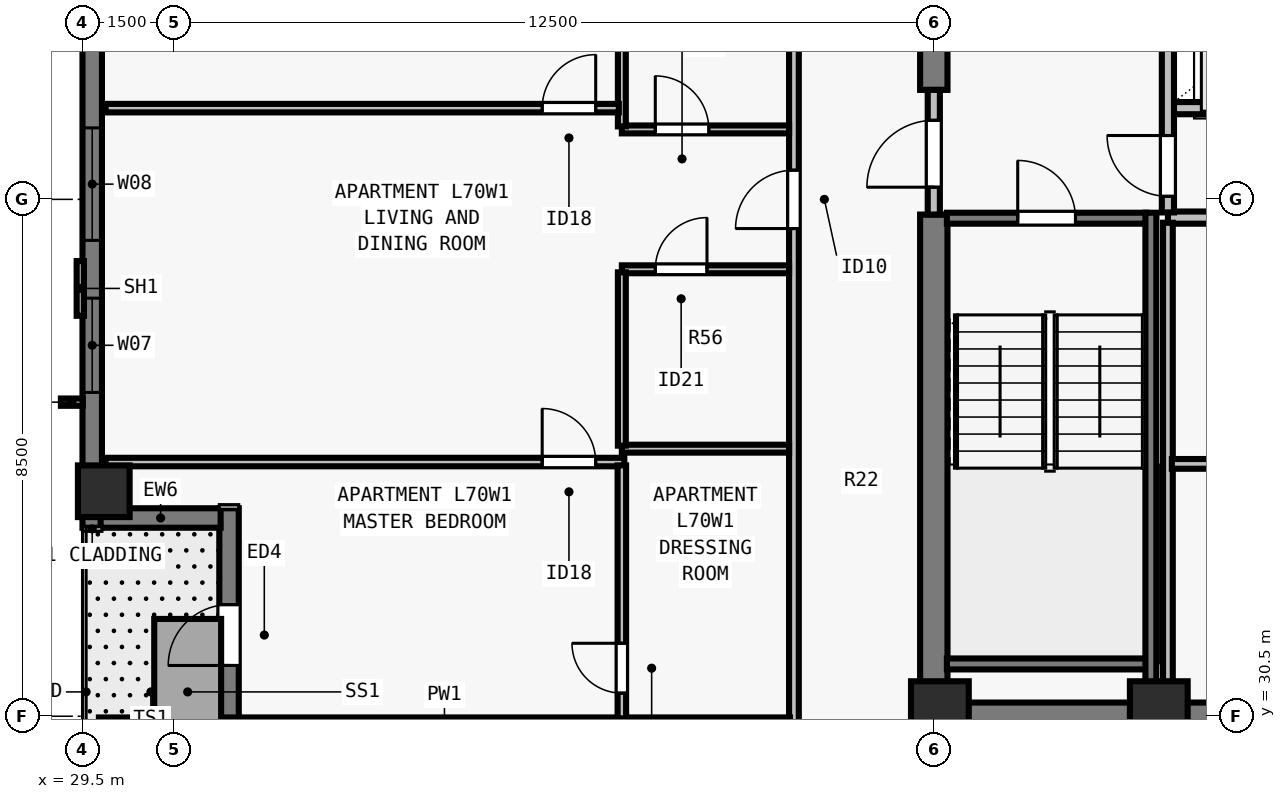
"""IFC4 building model, lengths in metres.
Left out: names, types, materials, properties, quantities, classifications, styles, units other than length and angle.
Written with IfcOpenShell. Run it as: python <this file> out.ifc"""

import sys

from ifc_helpers import new_model, si_unit, direction, frame, frame_2d, origin, origin_2d, place, context, subcontext, project, spatial, rectangle, extrude, element, fill, save


model = new_model("IFC4")
c1 = context("Model", 3, precision=1e-05, world=origin(), true_north=direction((0.0, 1.0)))
c2 = subcontext(c1, "Body", "Model", "MODEL_VIEW")
j1 = project(units=[si_unit("LENGTHUNIT", "METRE"), si_unit("PLANEANGLEUNIT", "RADIAN")], contexts=[c1])
p1 = place(None, origin())
s1 = spatial("IfcSite", under=j1, at=p1, CompositionType="ELEMENT")
p2 = place(p1, origin())
s2 = spatial("IfcBuilding", under=s1, at=p2, CompositionType="ELEMENT")
p3 = place(p2, frame((0.0, 0.0, 255.0)))
s3 = spatial("IfcBuildingStorey", under=s2, at=p3, CompositionType="ELEMENT", Elevation=255.0)
for number, where, z_axis, x_axis in (
    (1, (43.6, 30.6, 0.0), (0.0, 0.0, 1.0), (1.0, 0.0, 0.0)),
    (2, (47.2, 30.6, 0.0), (0.0, 0.0, 1.0), (1.0, 0.0, 0.0)),
):
    element("IfcColumn", number, at=place(p3, frame(where, z_axis=z_axis, x_axis=x_axis)), inside=s3, PredefinedType="COLUMN", context=c2, shape_type="SweptSolid", body=[
        extrude(rectangle(XDim=0.95, YDim=0.95, at=origin_2d()), origin(), (0.0, 0.0, 1.0), 3.5),
    ])
p4 = place(p3, frame((29.85, 34.2, 0.0), z_axis=(0.0, 0.0, 1.0), x_axis=(0.0, 1.0, 0.0)))
e3 = element("IfcColumn", 3, at=p4, inside=s3, PredefinedType="COLUMN", context=c2, shape_type="SweptSolid", body=[
    extrude(rectangle(XDim=0.85, YDim=0.85, at=origin_2d()), origin(), (0.0, 0.0, 1.0), 3.5),
])
p5 = place(p3, frame((29.66, 33.6, 0.0), z_axis=(0.0, 0.0, 1.0), x_axis=(0.0, 1.0, 0.0)))
e4 = element("IfcWall", 4, at=p5, inside=s3, PredefinedType="SOLIDWALL", context=c2, shape_type="SweptSolid", body=[
    extrude(rectangle(XDim=22.602, YDim=0.32, at=frame_2d((11.301, 0.0))), origin(), (0.0, 0.0, 1.0), 3.29),
])
p6 = place(p5, frame((2.225, 0.0, 0.8)))
e5 = element("IfcOpeningElement", 5, at=p6, cuts=e4, PredefinedType="OPENING", context=c2, shape_type="SweptSolid", body=[
    extrude(rectangle(XDim=1.55, YDim=1.678, at=frame_2d((0.775, 0.839))), frame((0.0, 0.17, 0.0), z_axis=(0.0, -1.0, 0.0), x_axis=(1.0, 0.0, 0.0)), (0.0, 0.0, 1.0), 0.34),
])
p7 = place(p5, frame((4.726, 0.0, 0.8)))
e6 = element("IfcOpeningElement", 6, at=p7, cuts=e4, PredefinedType="OPENING", context=c2, shape_type="SweptSolid", body=[
    extrude(rectangle(XDim=1.85, YDim=1.678, at=frame_2d((0.925, 0.839))), frame((0.0, 0.17, 0.0), z_axis=(0.0, -1.0, 0.0), x_axis=(1.0, 0.0, 0.0)), (0.0, 0.0, 1.0), 0.34),
])
p8 = place(p5, frame((11.726, 0.0, 0.8)))
e7 = element("IfcOpeningElement", 7, at=p8, cuts=e4, PredefinedType="OPENING", context=c2, shape_type="SweptSolid", body=[
    extrude(rectangle(XDim=1.85, YDim=1.678, at=frame_2d((0.925, 0.839))), frame((0.0, 0.17, 0.0), z_axis=(0.0, -1.0, 0.0), x_axis=(1.0, 0.0, 0.0)), (0.0, 0.0, 1.0), 0.34),
])
p9 = place(p3, frame((31.91, 28.178, 0.0), z_axis=(0.0, 0.0, 1.0), x_axis=(0.0, 1.0, 0.0)))
e8 = element("IfcWall", 8, at=p9, inside=s3, PredefinedType="SOLIDWALL", context=c2, shape_type="SweptSolid", body=[
    extrude(rectangle(XDim=5.742, YDim=0.32, at=frame_2d((2.871, 0.0))), origin(), (0.0, 0.0, 1.0), 3.29),
])
p10 = place(p9, frame((3.157, 0.0, 0.0)))
e9 = element("IfcOpeningElement", 9, at=p10, cuts=e8, PredefinedType="OPENING", context=c2, shape_type="SweptSolid", body=[
    extrude(rectangle(XDim=1.0, YDim=2.15, at=frame_2d((0.5, 1.075))), frame((0.0, 0.17, 0.0), z_axis=(0.0, -1.0, 0.0), x_axis=(1.0, 0.0, 0.0)), (0.0, 0.0, 1.0), 0.34),
])
p11 = place(p3, frame((31.772, 33.76, 0.0), z_axis=(0.0, 0.0, 1.0), x_axis=(-1.0, 0.0, 0.0)))
e10 = element("IfcWall", 10, at=p11, inside=s3, PredefinedType="SOLIDWALL", context=c2, shape_type="SweptSolid", body=[
    extrude(rectangle(XDim=1.974, YDim=0.32, at=frame_2d((0.987, 0.0))), origin(), (0.0, 0.0, 1.0), 3.29),
])
p12 = place(p3, frame((43.275, 30.5, 0.0), z_axis=(0.0, 0.0, 1.0), x_axis=(1.0, 0.0, 0.0)))
e11 = element("IfcWall", 11, at=p12, inside=s3, PredefinedType="SHEAR", context=c2, shape_type="SweptSolid", body=[
    extrude(rectangle(XDim=17.45, YDim=0.45, at=frame_2d((8.725, 0.0))), origin(), (0.0, 0.0, 1.0), 3.29),
])
p13 = place(p3, frame((43.5, 30.715, 0.0), z_axis=(0.0, 0.0, 1.0), x_axis=(0.0, 1.0, 0.0)))
e12 = element("IfcWall", 12, at=p13, inside=s3, PredefinedType="SHEAR", context=c2, shape_type="SweptSolid", body=[
    extrude(rectangle(XDim=8.035, YDim=0.45, at=frame_2d((4.018, 0.0))), origin(), (0.0, 0.0, 1.0), 3.29),
])
p14 = place(p3, frame((43.5, 40.8, 0.0), z_axis=(0.0, 0.0, 1.0), x_axis=(0.0, 1.0, 0.0)))
e13 = element("IfcWall", 13, at=p14, inside=s3, PredefinedType="SHEAR", context=c2, shape_type="SweptSolid", body=[
    extrude(rectangle(XDim=6.485, YDim=0.45, at=frame_2d((3.242, 0.0))), origin(), (0.0, 0.0, 1.0), 3.29),
])
for number, where, z_axis, x_axis in (
    (14, (47.35, 38.7, 0.0), (0.0, 0.0, 1.0), (1.0, 0.0, 0.0)),
    (15, (47.35, 40.5, 0.0), (0.0, 0.0, 1.0), (1.0, 0.0, 0.0)),
):
    element("IfcWall", number, at=place(p3, frame(where, z_axis=z_axis, x_axis=x_axis)), inside=s3, PredefinedType="SOLIDWALL", context=c2, shape_type="SweptSolid", body=[
        extrude(rectangle(XDim=2.95, YDim=0.2, at=frame_2d((1.475, 0.0))), origin(), (0.0, 0.0, 1.0), 3.29),
    ])
p15 = place(p3, frame((43.5, 38.75, 0.0), z_axis=(0.0, 0.0, 1.0), x_axis=(0.0, 1.0, 0.0)))
e16 = element("IfcWall", 16, at=p15, inside=s3, PredefinedType="SOLIDWALL", context=c2, shape_type="SweptSolid", body=[
    extrude(rectangle(XDim=2.05, YDim=0.2, at=frame_2d((1.025, 0.0))), origin(), (0.0, 0.0, 1.0), 3.29),
])
p16 = place(p15, frame((0.45, 0.0, 0.0)))
e17 = element("IfcOpeningElement", 17, at=p16, cuts=e16, PredefinedType="OPENING", context=c2, shape_type="SweptSolid", body=[
    extrude(rectangle(XDim=1.1, YDim=2.15, at=frame_2d((0.55, 1.075))), frame((0.0, 0.11, 0.0), z_axis=(0.0, -1.0, 0.0), x_axis=(1.0, 0.0, 0.0)), (0.0, 0.0, 1.0), 0.22),
])
p17 = place(p3, frame((47.35, 38.785, 0.0), z_axis=(0.0, 0.0, 1.0), x_axis=(0.0, 1.0, 0.0)))
e18 = element("IfcWall", 18, at=p17, inside=s3, PredefinedType="SOLIDWALL", context=c2, shape_type="SweptSolid", body=[
    extrude(rectangle(XDim=4.865, YDim=0.2, at=frame_2d((2.433, 0.0))), origin(), (0.0, 0.0, 1.0), 3.29),
])
p18 = place(p17, frame((0.265, 0.0, 0.0)))
e19 = element("IfcOpeningElement", 19, at=p18, cuts=e18, PredefinedType="OPENING", context=c2, shape_type="SweptSolid", body=[
    extrude(rectangle(XDim=1.0, YDim=2.15, at=frame_2d((0.5, 1.075))), frame((0.0, 0.11, 0.0), z_axis=(0.0, -1.0, 0.0), x_axis=(1.0, 0.0, 0.0)), (0.0, 0.0, 1.0), 0.22),
])
p19 = place(p3, frame((47.35, 30.71, 0.0), z_axis=(0.0, 0.0, 1.0), x_axis=(0.0, 1.0, 0.0)))
e20 = element("IfcWall", 20, at=p19, inside=s3, PredefinedType="PARTITIONING", context=c2, shape_type="SweptSolid", body=[
    extrude(rectangle(XDim=7.905, YDim=0.16, at=frame_2d((3.953, 0.0))), origin(), (0.0, 0.0, 1.0), 3.29),
])
p20 = place(p3, frame((47.415, 34.65, 0.0), z_axis=(0.0, 0.0, 1.0), x_axis=(1.0, 0.0, 0.0)))
e21 = element("IfcWall", 21, at=p20, inside=s3, PredefinedType="PARTITIONING", context=c2, shape_type="SweptSolid", body=[
    extrude(rectangle(XDim=2.8, YDim=0.16, at=frame_2d((1.4, 0.0))), origin(), (0.0, 0.0, 1.0), 3.29),
])
p21 = place(p3, frame((41.2, 30.4, 0.0), z_axis=(0.0, 0.0, 1.0), x_axis=(0.0, 1.0, 0.0)))
e22 = element("IfcWall", 22, at=p21, inside=s3, PredefinedType="PARTITIONING", context=c2, shape_type="SweptSolid", body=[
    extrude(rectangle(XDim=17.2, YDim=0.16, at=frame_2d((8.6, 0.0))), origin(), (0.0, 0.0, 1.0), 3.29),
])
p22 = place(p21, frame((8.12, 0.0, 0.0)))
e23 = element("IfcOpeningElement", 23, at=p22, cuts=e22, PredefinedType="OPENING", context=c2, shape_type="SweptSolid", body=[
    extrude(rectangle(XDim=0.96, YDim=2.18, at=frame_2d((0.48, 1.09))), frame((0.0, 0.09, 0.0), z_axis=(0.0, -1.0, 0.0), x_axis=(1.0, 0.0, 0.0)), (0.0, 0.0, 1.0), 0.18),
])
p23 = place(p3, frame((29.77, 30.4, 0.0), z_axis=(0.0, 0.0, 1.0), x_axis=(1.0, 0.0, 0.0)))
e24 = element("IfcWall", 24, at=p23, inside=s3, PredefinedType="PARTITIONING", context=c2, shape_type="SweptSolid", body=[
    extrude(rectangle(XDim=11.365, YDim=0.16, at=frame_2d((5.683, 0.0))), origin(), (0.0, 0.0, 1.0), 3.29),
])
p24 = place(p3, frame((38.37, 34.9, 0.0), z_axis=(0.0, 0.0, 1.0), x_axis=(1.0, 0.0, 0.0)))
e25 = element("IfcWall", 25, at=p24, inside=s3, PredefinedType="PLUMBINGWALL", context=c2, shape_type="SweptSolid", body=[
    extrude(rectangle(XDim=2.75, YDim=0.13, at=frame_2d((1.375, 0.0))), origin(), (0.0, 0.0, 1.0), 3.29),
])
p25 = place(p3, frame((38.37, 37.85, 0.0), z_axis=(0.0, 0.0, 1.0), x_axis=(1.0, 0.0, 0.0)))
e26 = element("IfcWall", 26, at=p25, inside=s3, PredefinedType="PLUMBINGWALL", context=c2, shape_type="SweptSolid", body=[
    extrude(rectangle(XDim=2.75, YDim=0.13, at=frame_2d((1.375, 0.0))), origin(), (0.0, 0.0, 1.0), 3.29),
])
p26 = place(p25, frame((0.55, 0.0, 0.0)))
e27 = element("IfcOpeningElement", 27, at=p26, cuts=e26, PredefinedType="OPENING", context=c2, shape_type="SweptSolid", body=[
    extrude(rectangle(XDim=0.85, YDim=2.08, at=frame_2d((0.425, 1.04))), frame((0.0, 0.075, 0.0), z_axis=(0.0, -1.0, 0.0), x_axis=(1.0, 0.0, 0.0)), (0.0, 0.0, 1.0), 0.15),
])
p27 = place(p3, frame((38.37, 34.95, 0.0), z_axis=(0.0, 0.0, 1.0), x_axis=(0.0, 1.0, 0.0)))
e28 = element("IfcWall", 28, at=p27, inside=s3, PredefinedType="PLUMBINGWALL", context=c2, shape_type="SweptSolid", body=[
    extrude(rectangle(XDim=2.85, YDim=0.13, at=frame_2d((1.425, 0.0))), origin(), (0.0, 0.0, 1.0), 3.29),
])
p28 = place(p3, frame((38.37, 40.15, 0.0), z_axis=(0.0, 0.0, 1.0), x_axis=(1.0, 0.0, 0.0)))
e29 = element("IfcWall", 29, at=p28, inside=s3, PredefinedType="PLUMBINGWALL", context=c2, shape_type="SweptSolid", body=[
    extrude(rectangle(XDim=2.75, YDim=0.13, at=frame_2d((1.375, 0.0))), origin(), (0.0, 0.0, 1.0), 3.29),
])
p29 = place(p28, frame((0.55, 0.0, 0.0)))
e30 = element("IfcOpeningElement", 30, at=p29, cuts=e29, PredefinedType="OPENING", context=c2, shape_type="SweptSolid", body=[
    extrude(rectangle(XDim=0.88, YDim=2.1, at=frame_2d((0.44, 1.05))), frame((0.0, 0.075, 0.0), z_axis=(0.0, -1.0, 0.0), x_axis=(1.0, 0.0, 0.0)), (0.0, 0.0, 1.0), 0.15),
])
p30 = place(p3, frame((38.37, 40.2, 0.0), z_axis=(0.0, 0.0, 1.0), x_axis=(0.0, 1.0, 0.0)))
e31 = element("IfcWall", 31, at=p30, inside=s3, PredefinedType="PLUMBINGWALL", context=c2, shape_type="SweptSolid", body=[
    extrude(rectangle(XDim=3.15, YDim=0.13, at=frame_2d((1.575, 0.0))), origin(), (0.0, 0.0, 1.0), 3.29),
])
p31 = place(p3, frame((29.88, 34.68, 0.0), z_axis=(0.0, 0.0, 1.0), x_axis=(1.0, 0.0, 0.0)))
e32 = element("IfcWall", 32, at=p31, inside=s3, PredefinedType="PARTITIONING", context=c2, shape_type="SweptSolid", body=[
    extrude(rectangle(XDim=8.53, YDim=0.14, at=frame_2d((4.265, 0.0))), origin(), (0.0, 0.0, 1.0), 2.958),
])
p32 = place(p31, frame((7.18, 0.0, 0.0)))
e33 = element("IfcOpeningElement", 33, at=p32, cuts=e32, PredefinedType="OPENING", context=c2, shape_type="SweptSolid", body=[
    extrude(rectangle(XDim=0.88, YDim=2.1, at=frame_2d((0.44, 1.05))), frame((0.0, 0.08, 0.0), z_axis=(0.0, -1.0, 0.0), x_axis=(1.0, 0.0, 0.0)), (0.0, 0.0, 1.0), 0.16),
])
p33 = place(p3, frame((38.37, 30.465, 0.0), z_axis=(0.0, 0.0, 1.0), x_axis=(0.0, 1.0, 0.0)))
e34 = element("IfcWall", 34, at=p33, inside=s3, PredefinedType="PARTITIONING", context=c2, shape_type="SweptSolid", body=[
    extrude(rectangle(XDim=4.16, YDim=0.14, at=frame_2d((2.08, 0.0))), origin(), (0.0, 0.0, 1.0), 3.29),
])
p34 = place(p33, frame((0.415, 0.0, 0.0)))
e35 = element("IfcOpeningElement", 35, at=p34, cuts=e34, PredefinedType="OPENING", context=c2, shape_type="SweptSolid", body=[
    extrude(rectangle(XDim=0.82, YDim=2.1, at=frame_2d((0.41, 1.05))), frame((0.0, 0.08, 0.0), z_axis=(0.0, -1.0, 0.0), x_axis=(1.0, 0.0, 0.0)), (0.0, 0.0, 1.0), 0.16),
])
p35 = place(p3, frame((29.88, 40.5, 0.0), z_axis=(0.0, 0.0, 1.0), x_axis=(1.0, 0.0, 0.0)))
e36 = element("IfcWall", 36, at=p35, inside=s3, PredefinedType="PARTITIONING", context=c2, shape_type="SweptSolid", body=[
    extrude(rectangle(XDim=8.44, YDim=0.14, at=frame_2d((4.22, 0.0))), origin(), (0.0, 0.0, 1.0), 2.958),
])
p36 = place(p35, frame((7.18, 0.0, 0.0)))
e37 = element("IfcOpeningElement", 37, at=p36, cuts=e36, PredefinedType="OPENING", context=c2, shape_type="SweptSolid", body=[
    extrude(rectangle(XDim=0.88, YDim=2.1, at=frame_2d((0.44, 1.05))), frame((0.0, 0.08, 0.0), z_axis=(0.0, -1.0, 0.0), x_axis=(1.0, 0.0, 0.0)), (0.0, 0.0, 1.0), 0.16),
])
p37 = place(p3, frame((43.715, 38.69, 0.0), z_axis=(0.0, 0.0, 1.0), x_axis=(1.0, 0.0, 0.0)))
e38 = element("IfcWall", 38, at=p37, inside=s3, PredefinedType="SOLIDWALL", context=c2, shape_type="SweptSolid", body=[
    extrude(rectangle(XDim=3.28, YDim=0.18, at=frame_2d((1.64, 0.0))), origin(), (0.0, 0.0, 1.0), 3.29),
])
p38 = place(p37, frame((1.165, 0.0, 0.0)))
e39 = element("IfcOpeningElement", 39, at=p38, cuts=e38, PredefinedType="OPENING", context=c2, shape_type="SweptSolid", body=[
    extrude(rectangle(XDim=0.95, YDim=2.15, at=frame_2d((0.475, 1.075))), frame((0.0, 0.1, 0.0), z_axis=(0.0, -1.0, 0.0), x_axis=(1.0, 0.0, 0.0)), (0.0, 0.0, 1.0), 0.2),
])
p39 = place(p3, frame((43.715, 31.36, 0.0), z_axis=(0.0, 0.0, 1.0), x_axis=(1.0, 0.0, 0.0)))
e40 = element("IfcWall", 40, at=p39, inside=s3, PredefinedType="SOLIDWALL", context=c2, shape_type="SweptSolid", body=[
    extrude(rectangle(XDim=3.28, YDim=0.18, at=frame_2d((1.64, 0.0))), origin(), (0.0, 0.0, 1.0), 3.29),
])
p40 = place(p3, frame((47.07, 38.78, 0.0), z_axis=(0.0, 0.0, 1.0), x_axis=(0.0, -1.0, 0.0)))
e41 = element("IfcWall", 41, at=p40, inside=s3, PredefinedType="SOLIDWALL", context=c2, shape_type="SweptSolid", body=[
    extrude(rectangle(XDim=8.067, YDim=0.18, at=frame_2d((4.034, 0.0))), origin(), (0.0, 0.0, 1.0), 3.29),
])
p41 = place(p6, origin())
e42 = element("IfcWindow", 42, at=p41, inside=s3, PartitioningType="SINGLE_PANEL", PredefinedType="WINDOW", context=c2, shape_type="SweptSolid", body=[
    extrude(rectangle(XDim=1.55, YDim=1.678, at=frame_2d((0.775, 0.839))), frame((0.0, -0.05, 0.0), z_axis=(0.0, -1.0, 0.0), x_axis=(1.0, 0.0, 0.0)), (0.0, 0.0, 1.0), 0.06),
])
fill(e5, e42)
p42 = place(p7, origin())
e43 = element("IfcWindow", 43, at=p42, inside=s3, PartitioningType="SINGLE_PANEL", PredefinedType="WINDOW", context=c2, shape_type="SweptSolid", body=[
    extrude(rectangle(XDim=1.85, YDim=1.678, at=frame_2d((0.925, 0.839))), frame((0.0, -0.05, 0.0), z_axis=(0.0, -1.0, 0.0), x_axis=(1.0, 0.0, 0.0)), (0.0, 0.0, 1.0), 0.06),
])
fill(e6, e43)
p43 = place(p10, origin())
e44 = element("IfcDoor", 44, at=p43, inside=s3, OperationType="SINGLE_SWING_LEFT", PredefinedType="DOOR", context=c2, shape_type="SweptSolid", body=[
    extrude(rectangle(XDim=1.0, YDim=2.15, at=frame_2d((0.5, 1.075))), frame((0.0, 0.025, 0.0), z_axis=(0.0, -1.0, 0.0), x_axis=(1.0, 0.0, 0.0)), (0.0, 0.0, 1.0), 0.05),
])
fill(e9, e44)
p44 = place(p16, origin())
e45 = element("IfcDoor", 45, at=p44, inside=s3, OperationType="SINGLE_SWING_LEFT", PredefinedType="DOOR", context=c2, shape_type="SweptSolid", body=[
    extrude(rectangle(XDim=1.1, YDim=2.15, at=frame_2d((0.55, 1.075))), frame((0.0, 0.025, 0.0), z_axis=(0.0, -1.0, 0.0), x_axis=(1.0, 0.0, 0.0)), (0.0, 0.0, 1.0), 0.05),
])
fill(e17, e45)
p45 = place(p18, origin())
e46 = element("IfcDoor", 46, at=p45, inside=s3, OperationType="SINGLE_SWING_RIGHT", PredefinedType="DOOR", context=c2, shape_type="SweptSolid", body=[
    extrude(rectangle(XDim=1.0, YDim=2.15, at=frame_2d((0.5, 1.075))), frame((0.0, 0.025, 0.0), z_axis=(0.0, -1.0, 0.0), x_axis=(1.0, 0.0, 0.0)), (0.0, 0.0, 1.0), 0.05),
])
fill(e19, e46)
p46 = place(p26, origin())
e47 = element("IfcDoor", 47, at=p46, inside=s3, OperationType="SINGLE_SWING_RIGHT", PredefinedType="DOOR", context=c2, shape_type="SweptSolid", body=[
    extrude(rectangle(XDim=0.85, YDim=2.08, at=frame_2d((0.425, 1.04))), frame((0.0, 0.025, 0.0), z_axis=(0.0, -1.0, 0.0), x_axis=(1.0, 0.0, 0.0)), (0.0, 0.0, 1.0), 0.05),
])
fill(e27, e47)
p47 = place(p29, origin())
e48 = element("IfcDoor", 48, at=p47, inside=s3, OperationType="SINGLE_SWING_LEFT", PredefinedType="DOOR", context=c2, shape_type="SweptSolid", body=[
    extrude(rectangle(XDim=0.88, YDim=2.1, at=frame_2d((0.44, 1.05))), frame((0.0, 0.025, 0.0), z_axis=(0.0, -1.0, 0.0), x_axis=(1.0, 0.0, 0.0)), (0.0, 0.0, 1.0), 0.05),
])
fill(e30, e48)
p48 = place(p34, origin())
e49 = element("IfcDoor", 49, at=p48, inside=s3, OperationType="SINGLE_SWING_RIGHT", PredefinedType="DOOR", context=c2, shape_type="SweptSolid", body=[
    extrude(rectangle(XDim=0.82, YDim=2.1, at=frame_2d((0.41, 1.05))), frame((0.0, 0.025, 0.0), z_axis=(0.0, -1.0, 0.0), x_axis=(1.0, 0.0, 0.0)), (0.0, 0.0, 1.0), 0.05),
])
fill(e35, e49)
p49 = place(p32, origin())
e50 = element("IfcDoor", 50, at=p49, inside=s3, OperationType="SINGLE_SWING_LEFT", PredefinedType="DOOR", context=c2, shape_type="SweptSolid", body=[
    extrude(rectangle(XDim=0.88, YDim=2.1, at=frame_2d((0.44, 1.05))), frame((0.0, 0.025, 0.0), z_axis=(0.0, -1.0, 0.0), x_axis=(1.0, 0.0, 0.0)), (0.0, 0.0, 1.0), 0.05),
])
fill(e33, e50)
p50 = place(p36, origin())
e51 = element("IfcDoor", 51, at=p50, inside=s3, OperationType="SINGLE_SWING_RIGHT", PredefinedType="DOOR", context=c2, shape_type="SweptSolid", body=[
    extrude(rectangle(XDim=0.88, YDim=2.1, at=frame_2d((0.44, 1.05))), frame((0.0, 0.025, 0.0), z_axis=(0.0, -1.0, 0.0), x_axis=(1.0, 0.0, 0.0)), (0.0, 0.0, 1.0), 0.05),
])
fill(e37, e51)
p51 = place(p22, origin())
e52 = element("IfcDoor", 52, at=p51, inside=s3, OperationType="SINGLE_SWING_LEFT", PredefinedType="DOOR", context=c2, shape_type="SweptSolid", body=[
    extrude(rectangle(XDim=0.96, YDim=2.18, at=frame_2d((0.48, 1.09))), frame((0.0, 0.025, 0.0), z_axis=(0.0, -1.0, 0.0), x_axis=(1.0, 0.0, 0.0)), (0.0, 0.0, 1.0), 0.05),
])
fill(e23, e52)
p52 = place(p38, origin())
e53 = element("IfcDoor", 53, at=p52, inside=s3, OperationType="SINGLE_SWING_LEFT", PredefinedType="DOOR", context=c2, shape_type="SweptSolid", body=[
    extrude(rectangle(XDim=0.95, YDim=2.15, at=frame_2d((0.475, 1.075))), frame((0.0, 0.025, 0.0), z_axis=(0.0, -1.0, 0.0), x_axis=(1.0, 0.0, 0.0)), (0.0, 0.0, 1.0), 0.05),
])
fill(e39, e53)
save(model, sys.argv[1])
